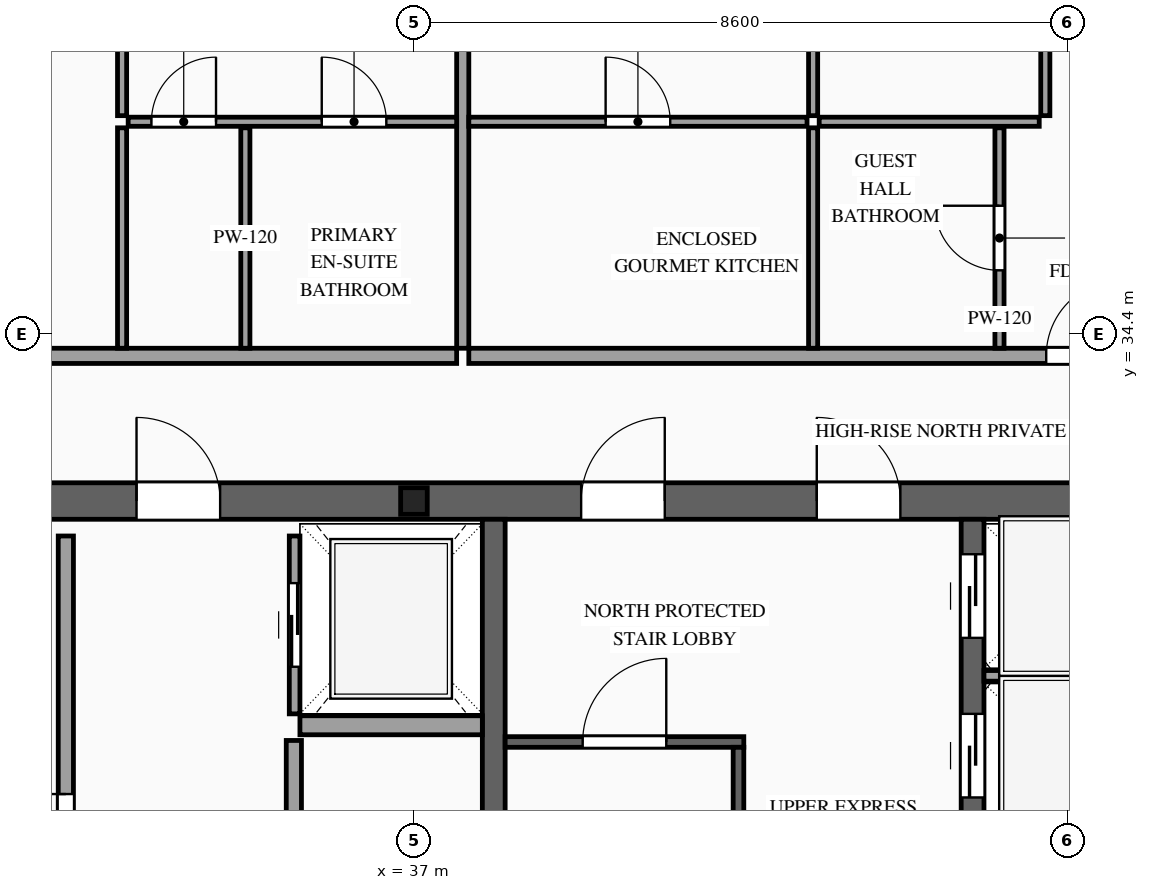
"""IFC4 building model, lengths in metres.
Left out: names, types, materials, properties, quantities, classifications, styles, units other than length and angle.
Written with IfcOpenShell. Run it as: python <this file> out.ifc"""

import sys

from ifc_helpers import new_model, si_unit, direction, frame, frame_2d, origin, origin_2d, place, context, subcontext, project, spatial, rectangle, i_section, extrude, source, transform, mapped, element, fill, save


model = new_model("IFC4")
c1 = context("Model", 3, precision=1e-05, world=origin(), true_north=direction((0.0, 1.0)))
c2 = subcontext(c1, "Body", "Model", "MODEL_VIEW")
j1 = project(units=[si_unit("LENGTHUNIT", "METRE"), si_unit("PLANEANGLEUNIT", "RADIAN")], contexts=[c1])
p1 = place(None, origin())
s1 = spatial("IfcSite", under=j1, at=p1, CompositionType="ELEMENT")
p2 = place(p1, origin())
s2 = spatial("IfcBuilding", under=s1, at=p2, CompositionType="ELEMENT")
p3 = place(p2, frame((0.0, 0.0, 289.1)))
s3 = spatial("IfcBuildingStorey", under=s2, at=p3, CompositionType="ELEMENT", Elevation=289.1)
p4 = place(p3, frame((23.56, 32.2, 0.0), z_axis=(0.0, 0.0, 1.0), x_axis=(1.0, 0.0, 0.0)))
e1 = element("IfcWall", 1, at=p4, inside=s3, PredefinedType="SHEAR", context=c2, shape_type="SweptSolid", body=[
    extrude(rectangle(XDim=26.88, YDim=0.48, at=frame_2d((13.44, 0.0))), origin(), (0.0, 0.0, 1.0), 3.5),
])
p5 = place(p4, frame((4.51, 0.0, 0.0)))
e2 = element("IfcOpeningElement", 2, at=p5, cuts=e1, PredefinedType="OPENING", context=c2, shape_type="SweptSolid", body=[
    extrude(rectangle(XDim=0.9, YDim=2.15, at=frame_2d((0.45, 1.075))), frame((0.0, 0.255, 0.0), z_axis=(0.0, -1.0, 0.0), x_axis=(1.0, 0.0, 0.0)), (0.0, 0.0, 1.0), 0.51),
])
p6 = place(p4, frame((9.79, 0.0, 0.0)))
e3 = element("IfcOpeningElement", 3, at=p6, cuts=e1, PredefinedType="OPENING", context=c2, shape_type="SweptSolid", body=[
    extrude(rectangle(XDim=1.1, YDim=2.2, at=frame_2d((0.55, 1.1))), frame((0.0, 0.255, 0.0), z_axis=(0.0, -1.0, 0.0), x_axis=(1.0, 0.0, 0.0)), (0.0, 0.0, 1.0), 0.51),
])
p7 = place(p4, frame((15.64, 0.0, 0.0)))
e4 = element("IfcOpeningElement", 4, at=p7, cuts=e1, PredefinedType="OPENING", context=c2, shape_type="SweptSolid", body=[
    extrude(rectangle(XDim=1.1, YDim=2.2, at=frame_2d((0.55, 1.1))), frame((0.0, 0.255, 0.0), z_axis=(0.0, -1.0, 0.0), x_axis=(1.0, 0.0, 0.0)), (0.0, 0.0, 1.0), 0.51),
])
p8 = place(p4, frame((18.74, 0.0, 0.0)))
e5 = element("IfcOpeningElement", 5, at=p8, cuts=e1, PredefinedType="OPENING", context=c2, shape_type="SweptSolid", body=[
    extrude(rectangle(XDim=1.1, YDim=2.2, at=frame_2d((0.55, 1.1))), frame((0.0, 0.255, 0.0), z_axis=(0.0, -1.0, 0.0), x_axis=(1.0, 0.0, 0.0)), (0.0, 0.0, 1.0), 0.51),
])
m1 = source(origin(), c2, "Body", "SweptSolid", [
    extrude(rectangle(XDim=12.32, YDim=0.3, at=frame_2d((6.16, 0.0))), origin(), (0.0, 0.0, 1.0), 3.5),
])
p9 = place(p3, frame((38.05, 19.64, 0.0), z_axis=(0.0, 0.0, 1.0), x_axis=(0.0, 1.0, 0.0)))
e6 = element("IfcWall", 6, at=p9, inside=s3, PredefinedType="SOLIDWALL", context=c2, shape_type="MappedRepresentation", body=[
    mapped(m1, transform((0.0, 0.0, 0.0), scale=1.0)),
])
p10 = place(p3, frame((44.35, 19.64, 0.0), z_axis=(0.0, 0.0, 1.0), x_axis=(0.0, 1.0, 0.0)))
e7 = element("IfcWall", 7, at=p10, inside=s3, PredefinedType="SOLIDWALL", context=c2, shape_type="SweptSolid", body=[
    extrude(rectangle(XDim=12.32, YDim=0.3, at=frame_2d((6.16, 0.0))), origin(), (0.0, 0.0, 1.0), 3.5),
])
p11 = place(p10, frame((6.56, 0.0, 0.0)))
e8 = element("IfcOpeningElement", 8, at=p11, cuts=e7, PredefinedType="OPENING", context=c2, shape_type="SweptSolid", body=[
    extrude(rectangle(XDim=1.1, YDim=2.2, at=frame_2d((0.55, 1.1))), frame((0.0, 0.165, 0.0), z_axis=(0.0, -1.0, 0.0), x_axis=(1.0, 0.0, 0.0)), (0.0, 0.0, 1.0), 0.33),
])
p12 = place(p10, frame((8.66, 0.0, 0.0)))
e9 = element("IfcOpeningElement", 9, at=p12, cuts=e7, PredefinedType="OPENING", context=c2, shape_type="SweptSolid", body=[
    extrude(rectangle(XDim=1.1, YDim=2.2, at=frame_2d((0.55, 1.1))), frame((0.0, 0.165, 0.0), z_axis=(0.0, -1.0, 0.0), x_axis=(1.0, 0.0, 0.0)), (0.0, 0.0, 1.0), 0.33),
])
p13 = place(p10, frame((10.76, 0.0, 0.0)))
e10 = element("IfcOpeningElement", 10, at=p13, cuts=e7, PredefinedType="OPENING", context=c2, shape_type="SweptSolid", body=[
    extrude(rectangle(XDim=1.1, YDim=2.2, at=frame_2d((0.55, 1.1))), frame((0.0, 0.165, 0.0), z_axis=(0.0, -1.0, 0.0), x_axis=(1.0, 0.0, 0.0)), (0.0, 0.0, 1.0), 0.33),
])
m2 = source(origin(), c2, "Body", "SweptSolid", [
    extrude(i_section(OverallWidth=0.35, OverallDepth=0.35, WebThickness=0.012, FlangeThickness=0.019, at=origin_2d()), origin(), (0.0, 0.0, 1.0), 3.5),
])
p14 = place(p3, frame((37.0, 32.2, 0.0), z_axis=(0.0, 0.0, 1.0), x_axis=(1.0, 0.0, 0.0)))
e11 = element("IfcColumn", 11, at=p14, inside=s3, PredefinedType="COLUMN", context=c2, shape_type="MappedRepresentation", body=[
    mapped(m2, transform((0.0, 0.0, 0.0), scale=1.0)),
])
p15 = place(p3, frame((35.43, 29.4, 0.0), z_axis=(0.0, 0.0, 1.0), x_axis=(0.0, 1.0, 0.0)))
e12 = element("IfcWall", 12, at=p15, inside=s3, PredefinedType="SOLIDWALL", context=c2, shape_type="SweptSolid", body=[
    extrude(rectangle(XDim=2.34, YDim=0.14, at=frame_2d((1.17, 0.0))), origin(), (0.0, 0.0, 1.0), 3.28),
])
p16 = place(p15, frame((0.62, 0.0, 0.0)))
e13 = element("IfcOpeningElement", 13, at=p16, cuts=e12, PredefinedType="OPENING", context=c2, shape_type="SweptSolid", body=[
    extrude(rectangle(XDim=1.1, YDim=2.2, at=frame_2d((0.55, 1.1))), frame((0.0, 0.085, 0.0), z_axis=(0.0, -1.0, 0.0), x_axis=(1.0, 0.0, 0.0)), (0.0, 0.0, 1.0), 0.17),
])
m3 = source(origin(), c2, "Body", "SweptSolid", [
    extrude(rectangle(XDim=2.4, YDim=0.25, at=frame_2d((1.2, 0.0))), origin(), (0.0, 0.0, 1.0), 3.28),
])
p17 = place(p3, frame((35.5, 29.25, 0.0), z_axis=(0.0, 0.0, 1.0), x_axis=(1.0, 0.0, 0.0)))
e14 = element("IfcWall", 14, at=p17, inside=s3, PredefinedType="SOLIDWALL", context=c2, shape_type="MappedRepresentation", body=[
    mapped(m3, transform((0.0, 0.0, 0.0), scale=1.0)),
])
m4 = source(origin(), c2, "Body", "SweptSolid", [
    extrude(rectangle(XDim=2.0, YDim=0.14, at=frame_2d((1.0, 0.0))), origin(), (0.0, 0.0, 1.0), 3.28),
])
p18 = place(p3, frame((44.5, 29.9, 0.0), z_axis=(0.0, 0.0, 1.0), x_axis=(1.0, 0.0, 0.0)))
e15 = element("IfcWall", 15, at=p18, inside=s3, PredefinedType="SOLIDWALL", context=c2, shape_type="MappedRepresentation", body=[
    mapped(m4, transform((0.0, 0.0, 0.0), scale=1.0)),
])
p19 = place(p3, frame((38.2, 29.03, 0.0), z_axis=(0.0, 0.0, 1.0), x_axis=(1.0, 0.0, 0.0)))
e16 = element("IfcWall", 16, at=p19, inside=s3, PredefinedType="SOLIDWALL", context=c2, shape_type="SweptSolid", body=[
    extrude(rectangle(XDim=3.14, YDim=0.14, at=frame_2d((1.57, 0.0))), origin(), (0.0, 0.0, 1.0), 3.28),
])
p20 = place(p19, frame((1.02, 0.0, 0.0)))
e17 = element("IfcOpeningElement", 17, at=p20, cuts=e16, PredefinedType="OPENING", context=c2, shape_type="SweptSolid", body=[
    extrude(rectangle(XDim=1.1, YDim=2.2, at=frame_2d((0.55, 1.1))), frame((0.0, 0.085, 0.0), z_axis=(0.0, -1.0, 0.0), x_axis=(1.0, 0.0, 0.0)), (0.0, 0.0, 1.0), 0.17),
])
m5 = source(origin(), c2, "Body", "SweptSolid", [
    extrude(rectangle(XDim=8.94, YDim=0.14, at=frame_2d((4.47, 0.0))), origin(), (0.0, 0.0, 1.0), 3.28),
])
p21 = place(p3, frame((41.27, 20.02, 0.0), z_axis=(0.0, 0.0, 1.0), x_axis=(0.0, 1.0, 0.0)))
e18 = element("IfcWall", 18, at=p21, inside=s3, PredefinedType="SOLIDWALL", context=c2, shape_type="MappedRepresentation", body=[
    mapped(m5, transform((0.0, 0.0, 0.0), scale=1.0)),
])
p22 = place(p3, frame((32.42, 24.05, 0.0), z_axis=(0.0, 0.0, 1.0), x_axis=(0.0, 1.0, 0.0)))
e19 = element("IfcWall", 19, at=p22, inside=s3, PredefinedType="PARTITIONING", context=c2, shape_type="SweptSolid", body=[
    extrude(rectangle(XDim=7.69, YDim=0.2, at=frame_2d((3.845, 0.0))), origin(), (0.0, 0.0, 1.0), 3.28),
])
p23 = place(p22, frame((3.395, 0.0, 0.0)))
e20 = element("IfcOpeningElement", 20, at=p23, cuts=e19, PredefinedType="OPENING", context=c2, shape_type="SweptSolid", body=[
    extrude(rectangle(XDim=0.9, YDim=2.15, at=frame_2d((0.45, 1.075))), frame((0.0, 0.115, 0.0), z_axis=(0.0, -1.0, 0.0), x_axis=(1.0, 0.0, 0.0)), (0.0, 0.0, 1.0), 0.23),
])
p24 = place(p3, frame((35.42, 19.86, 0.0), z_axis=(0.0, 0.0, 1.0), x_axis=(0.0, 1.0, 0.0)))
e21 = element("IfcWall", 21, at=p24, inside=s3, PredefinedType="PARTITIONING", context=c2, shape_type="SweptSolid", body=[
    extrude(rectangle(XDim=9.19, YDim=0.2, at=frame_2d((4.595, 0.0))), origin(), (0.0, 0.0, 1.0), 3.28),
])
p25 = place(p24, frame((4.145, 0.0, 0.0)))
e22 = element("IfcOpeningElement", 22, at=p25, cuts=e21, PredefinedType="OPENING", context=c2, shape_type="SweptSolid", body=[
    extrude(rectangle(XDim=0.9, YDim=2.15, at=frame_2d((0.45, 1.075))), frame((0.0, 0.115, 0.0), z_axis=(0.0, -1.0, 0.0), x_axis=(1.0, 0.0, 0.0)), (0.0, 0.0, 1.0), 0.23),
])
p26 = place(p3, frame((20.94, 34.11, 0.0), z_axis=(0.0, 0.0, 1.0), x_axis=(1.0, 0.0, 0.0)))
e23 = element("IfcWall", 23, at=p26, inside=s3, PredefinedType="PARTITIONING", context=c2, shape_type="SweptSolid", body=[
    extrude(rectangle(XDim=16.622, YDim=0.2, at=frame_2d((8.311, 0.0))), origin(), (0.0, 0.0, 1.0), 3.28),
])
p27 = place(p26, frame((9.611, 0.0, 0.0)))
e24 = element("IfcOpeningElement", 24, at=p27, cuts=e23, PredefinedType="OPENING", context=c2, shape_type="SweptSolid", body=[
    extrude(rectangle(XDim=1.0, YDim=2.2, at=frame_2d((0.5, 1.1))), frame((0.0, 0.115, 0.0), z_axis=(0.0, -1.0, 0.0), x_axis=(1.0, 0.0, 0.0)), (0.0, 0.0, 1.0), 0.23),
])
m6 = source(origin(), c2, "Body", "SweptSolid", [
    extrude(rectangle(XDim=10.54, YDim=0.16, at=frame_2d((5.27, 0.0))), origin(), (0.0, 0.0, 1.0), 3.28),
])
p28 = place(p3, frame((37.642, 34.21, 0.0), z_axis=(0.0, 0.0, 1.0), x_axis=(0.0, 1.0, 0.0)))
e25 = element("IfcWall", 25, at=p28, inside=s3, PredefinedType="PARTITIONING", context=c2, shape_type="MappedRepresentation", body=[
    mapped(m6, transform((0.0, 0.0, 0.0), scale=1.0)),
])
m7 = source(origin(), c2, "Body", "SweptSolid", [
    extrude(rectangle(XDim=2.9, YDim=0.12, at=frame_2d((1.45, 0.0))), origin(), (0.0, 0.0, 1.0), 3.28),
])
for number, where, z_axis, x_axis in (
    (26, (34.782, 34.21, 0.0), (0.0, 0.0, 1.0), (0.0, 1.0, 0.0)),
    (27, (33.16, 34.21, 0.0), (0.0, 0.0, 1.0), (0.0, 1.0, 0.0)),
):
    element("IfcWall", number, at=place(p3, frame(where, z_axis=z_axis, x_axis=x_axis)), inside=s3, PredefinedType="PARTITIONING", context=c2, shape_type="MappedRepresentation", body=[
        mapped(m7, transform((0.0, 0.0, 0.0), scale=1.0)),
    ])
p29 = place(p3, frame((33.24, 37.19, 0.0), z_axis=(0.0, 0.0, 1.0), x_axis=(1.0, 0.0, 0.0)))
e28 = element("IfcWall", 28, at=p29, inside=s3, PredefinedType="PARTITIONING", context=c2, shape_type="SweptSolid", body=[
    extrude(rectangle(XDim=4.322, YDim=0.12, at=frame_2d((2.161, 0.0))), origin(), (0.0, 0.0, 1.0), 3.28),
])
p30 = place(p29, frame((2.547, 0.0, 0.0)))
e29 = element("IfcOpeningElement", 29, at=p30, cuts=e28, PredefinedType="OPENING", context=c2, shape_type="SweptSolid", body=[
    extrude(rectangle(XDim=0.85, YDim=2.1, at=frame_2d((0.425, 1.05))), frame((0.0, 0.075, 0.0), z_axis=(0.0, -1.0, 0.0), x_axis=(1.0, 0.0, 0.0)), (0.0, 0.0, 1.0), 0.15),
])
p31 = place(p29, frame((0.306, 0.0, 0.0)))
e30 = element("IfcOpeningElement", 30, at=p31, cuts=e28, PredefinedType="OPENING", context=c2, shape_type="SweptSolid", body=[
    extrude(rectangle(XDim=0.85, YDim=2.1, at=frame_2d((0.425, 1.05))), frame((0.0, 0.075, 0.0), z_axis=(0.0, -1.0, 0.0), x_axis=(1.0, 0.0, 0.0)), (0.0, 0.0, 1.0), 0.15),
])
p32 = place(p3, frame((33.16, 37.27, 0.0), z_axis=(0.0, 0.0, 1.0), x_axis=(0.0, 1.0, 0.0)))
e31 = element("IfcWall", 31, at=p32, inside=s3, PredefinedType="PARTITIONING", context=c2, shape_type="SweptSolid", body=[
    extrude(rectangle(XDim=7.48, YDim=0.12, at=frame_2d((3.74, 0.0))), origin(), (0.0, 0.0, 1.0), 3.28),
])
p33 = place(p32, frame((3.29, 0.0, 0.0)))
e32 = element("IfcOpeningElement", 32, at=p33, cuts=e31, PredefinedType="OPENING", context=c2, shape_type="SweptSolid", body=[
    extrude(rectangle(XDim=0.9, YDim=2.15, at=frame_2d((0.45, 1.075))), frame((0.0, 0.075, 0.0), z_axis=(0.0, -1.0, 0.0), x_axis=(1.0, 0.0, 0.0)), (0.0, 0.0, 1.0), 0.15),
])
p34 = place(p3, frame((37.722, 34.11, 0.0), z_axis=(0.0, 0.0, 1.0), x_axis=(1.0, 0.0, 0.0)))
e33 = element("IfcWall", 33, at=p34, inside=s3, PredefinedType="PARTITIONING", context=c2, shape_type="SweptSolid", body=[
    extrude(rectangle(XDim=15.338, YDim=0.2, at=frame_2d((7.669, 0.0))), origin(), (0.0, 0.0, 1.0), 3.28),
])
p35 = place(p34, frame((7.597, 0.0, 0.0)))
e34 = element("IfcOpeningElement", 34, at=p35, cuts=e33, PredefinedType="OPENING", context=c2, shape_type="SweptSolid", body=[
    extrude(rectangle(XDim=1.0, YDim=2.2, at=frame_2d((0.5, 1.1))), frame((0.0, 0.115, 0.0), z_axis=(0.0, -1.0, 0.0), x_axis=(1.0, 0.0, 0.0)), (0.0, 0.0, 1.0), 0.23),
])
p36 = place(p3, frame((37.722, 37.19, 0.0), z_axis=(0.0, 0.0, 1.0), x_axis=(1.0, 0.0, 0.0)))
e35 = element("IfcWall", 35, at=p36, inside=s3, PredefinedType="PARTITIONING", context=c2, shape_type="SweptSolid", body=[
    extrude(rectangle(XDim=4.45, YDim=0.12, at=frame_2d((2.225, 0.0))), origin(), (0.0, 0.0, 1.0), 3.28),
])
p37 = place(p36, frame((1.8, 0.0, 0.0)))
e36 = element("IfcOpeningElement", 36, at=p37, cuts=e35, PredefinedType="OPENING", context=c2, shape_type="SweptSolid", body=[
    extrude(rectangle(XDim=0.85, YDim=2.1, at=frame_2d((0.425, 1.05))), frame((0.0, 0.075, 0.0), z_axis=(0.0, -1.0, 0.0), x_axis=(1.0, 0.0, 0.0)), (0.0, 0.0, 1.0), 0.15),
])
p38 = place(p3, frame((42.252, 34.21, 0.0), z_axis=(0.0, 0.0, 1.0), x_axis=(0.0, 1.0, 0.0)))
e37 = element("IfcWall", 37, at=p38, inside=s3, PredefinedType="PARTITIONING", context=c2, shape_type="MappedRepresentation", body=[
    mapped(m7, transform((0.0, 0.0, 0.0), scale=1.0)),
])
p39 = place(p3, frame((44.704, 34.21, 0.0), z_axis=(0.0, 0.0, 1.0), x_axis=(0.0, 1.0, 0.0)))
e38 = element("IfcWall", 38, at=p39, inside=s3, PredefinedType="PARTITIONING", context=c2, shape_type="SweptSolid", body=[
    extrude(rectangle(XDim=2.9, YDim=0.12, at=frame_2d((1.45, 0.0))), origin(), (0.0, 0.0, 1.0), 3.28),
])
p40 = place(p39, frame((1.025, 0.0, 0.0)))
e39 = element("IfcOpeningElement", 39, at=p40, cuts=e38, PredefinedType="OPENING", context=c2, shape_type="SweptSolid", body=[
    extrude(rectangle(XDim=0.85, YDim=2.1, at=frame_2d((0.425, 1.05))), frame((0.0, 0.075, 0.0), z_axis=(0.0, -1.0, 0.0), x_axis=(1.0, 0.0, 0.0)), (0.0, 0.0, 1.0), 0.15),
])
p41 = place(p3, frame((42.252, 37.27, 0.0), z_axis=(0.0, 0.0, 1.0), x_axis=(0.0, 1.0, 0.0)))
e40 = element("IfcWall", 40, at=p41, inside=s3, PredefinedType="PARTITIONING", context=c2, shape_type="SweptSolid", body=[
    extrude(rectangle(XDim=7.48, YDim=0.12, at=frame_2d((3.74, 0.0))), origin(), (0.0, 0.0, 1.0), 3.28),
])
p42 = place(p41, frame((3.29, 0.0, 0.0)))
e41 = element("IfcOpeningElement", 41, at=p42, cuts=e40, PredefinedType="OPENING", context=c2, shape_type="SweptSolid", body=[
    extrude(rectangle(XDim=0.9, YDim=2.15, at=frame_2d((0.45, 1.075))), frame((0.0, 0.075, 0.0), z_axis=(0.0, -1.0, 0.0), x_axis=(1.0, 0.0, 0.0)), (0.0, 0.0, 1.0), 0.15),
])
m8 = source(origin(), c2, "Body", "SweptSolid", [
    extrude(rectangle(XDim=2.895, YDim=0.12, at=frame_2d((1.448, 0.0))), origin(), (0.0, 0.0, 1.0), 3.28),
])
p43 = place(p3, frame((42.332, 37.19, 0.0), z_axis=(0.0, 0.0, 1.0), x_axis=(1.0, 0.0, 0.0)))
e42 = element("IfcWall", 42, at=p43, inside=s3, PredefinedType="PARTITIONING", context=c2, shape_type="MappedRepresentation", body=[
    mapped(m8, transform((0.0, 0.0, 0.0), scale=1.0)),
])
p44 = place(p3, frame((45.307, 37.27, 0.0), z_axis=(0.0, 0.0, 1.0), x_axis=(0.0, 1.0, 0.0)))
e43 = element("IfcWall", 43, at=p44, inside=s3, PredefinedType="PARTITIONING", context=c2, shape_type="SweptSolid", body=[
    extrude(rectangle(XDim=7.48, YDim=0.12, at=frame_2d((3.74, 0.0))), origin(), (0.0, 0.0, 1.0), 3.28),
])
p45 = place(p44, frame((3.29, 0.0, 0.0)))
e44 = element("IfcOpeningElement", 44, at=p45, cuts=e43, PredefinedType="OPENING", context=c2, shape_type="SweptSolid", body=[
    extrude(rectangle(XDim=0.9, YDim=2.15, at=frame_2d((0.45, 1.075))), frame((0.0, 0.075, 0.0), z_axis=(0.0, -1.0, 0.0), x_axis=(1.0, 0.0, 0.0)), (0.0, 0.0, 1.0), 0.15),
])
m9 = source(origin(), c2, "Body", "SweptSolid", [
    extrude(rectangle(XDim=1.1, YDim=2.2, at=frame_2d((0.55, 1.1))), frame((0.0, 0.025, 0.0), z_axis=(0.0, -1.0, 0.0), x_axis=(1.0, 0.0, 0.0)), (0.0, 0.0, 1.0), 0.05),
])
p46 = place(p16, origin())
e45 = element("IfcDoor", 45, at=p46, inside=s3, OperationType="SLIDING_TO_RIGHT", PredefinedType="DOOR", context=c2, shape_type="MappedRepresentation", body=[
    mapped(m9, transform((0.0, 0.0, 0.0), scale=1.0)),
])
fill(e13, e45)
p47 = place(p12, origin())
e46 = element("IfcDoor", 46, at=p47, inside=s3, OperationType="SLIDING_TO_RIGHT", PredefinedType="DOOR", context=c2, shape_type="MappedRepresentation", body=[
    mapped(m9, transform((0.0, 0.0, 0.0), scale=1.0)),
])
fill(e9, e46)
p48 = place(p13, origin())
e47 = element("IfcDoor", 47, at=p48, inside=s3, OperationType="SLIDING_TO_LEFT", PredefinedType="DOOR", context=c2, shape_type="MappedRepresentation", body=[
    mapped(m9, transform((0.0, 0.0, 0.0), scale=1.0)),
])
fill(e10, e47)
m10 = source(origin(), c2, "Body", "SweptSolid", [
    extrude(rectangle(XDim=1.1, YDim=2.2, at=frame_2d((0.55, 1.1))), frame((0.0, 0.025, 0.0), z_axis=(0.0, -1.0, 0.0), x_axis=(1.0, 0.0, 0.0)), (0.0, 0.0, 1.0), 0.05),
])
p49 = place(p20, origin())
e48 = element("IfcDoor", 48, at=p49, inside=s3, OperationType="SINGLE_SWING_RIGHT", PredefinedType="DOOR", context=c2, shape_type="MappedRepresentation", body=[
    mapped(m10, transform((0.0, 0.0, 0.0), scale=1.0)),
])
fill(e17, e48)
p50 = place(p6, origin())
e49 = element("IfcDoor", 49, at=p50, inside=s3, OperationType="SINGLE_SWING_LEFT", PredefinedType="DOOR", context=c2, shape_type="MappedRepresentation", body=[
    mapped(m10, transform((0.0, 0.0, 0.0), scale=1.0)),
])
fill(e3, e49)
p51 = place(p7, origin())
e50 = element("IfcDoor", 50, at=p51, inside=s3, OperationType="SINGLE_SWING_RIGHT", PredefinedType="DOOR", context=c2, shape_type="MappedRepresentation", body=[
    mapped(m10, transform((0.0, 0.0, 0.0), scale=1.0)),
])
fill(e4, e50)
p52 = place(p8, origin())
e51 = element("IfcDoor", 51, at=p52, inside=s3, OperationType="SINGLE_SWING_LEFT", PredefinedType="DOOR", context=c2, shape_type="MappedRepresentation", body=[
    mapped(m10, transform((0.0, 0.0, 0.0), scale=1.0)),
])
fill(e5, e51)
m11 = source(origin(), c2, "Body", "SweptSolid", [
    extrude(rectangle(XDim=0.9, YDim=2.15, at=frame_2d((0.45, 1.075))), frame((0.0, 0.025, 0.0), z_axis=(0.0, -1.0, 0.0), x_axis=(1.0, 0.0, 0.0)), (0.0, 0.0, 1.0), 0.05),
])
p53 = place(p23, origin())
e52 = element("IfcDoor", 52, at=p53, inside=s3, OperationType="SINGLE_SWING_RIGHT", PredefinedType="DOOR", context=c2, shape_type="MappedRepresentation", body=[
    mapped(m11, transform((0.0, 0.0, 0.0), scale=1.0)),
])
fill(e20, e52)
m12 = source(origin(), c2, "Body", "SweptSolid", [
    extrude(rectangle(XDim=0.85, YDim=2.1, at=frame_2d((0.425, 1.05))), frame((0.0, 0.025, 0.0), z_axis=(0.0, -1.0, 0.0), x_axis=(1.0, 0.0, 0.0)), (0.0, 0.0, 1.0), 0.05),
])
p54 = place(p30, origin())
e53 = element("IfcDoor", 53, at=p54, inside=s3, OperationType="SINGLE_SWING_LEFT", PredefinedType="DOOR", context=c2, shape_type="MappedRepresentation", body=[
    mapped(m12, transform((0.0, 0.0, 0.0), scale=1.0)),
])
fill(e29, e53)
p55 = place(p31, origin())
e54 = element("IfcDoor", 54, at=p55, inside=s3, OperationType="SINGLE_SWING_RIGHT", PredefinedType="DOOR", context=c2, shape_type="MappedRepresentation", body=[
    mapped(m12, transform((0.0, 0.0, 0.0), scale=1.0)),
])
fill(e30, e54)
m13 = source(origin(), c2, "Body", "SweptSolid", [
    extrude(rectangle(XDim=1.0, YDim=2.2, at=frame_2d((0.5, 1.1))), frame((0.0, 0.025, 0.0), z_axis=(0.0, -1.0, 0.0), x_axis=(1.0, 0.0, 0.0)), (0.0, 0.0, 1.0), 0.05),
])
p56 = place(p35, origin())
e55 = element("IfcDoor", 55, at=p56, inside=s3, OperationType="SINGLE_SWING_RIGHT", PredefinedType="DOOR", context=c2, shape_type="MappedRepresentation", body=[
    mapped(m13, transform((0.0, 0.0, 0.0), scale=1.0)),
])
fill(e34, e55)
p57 = place(p37, origin())
e56 = element("IfcDoor", 56, at=p57, inside=s3, OperationType="SINGLE_SWING_LEFT", PredefinedType="DOOR", context=c2, shape_type="MappedRepresentation", body=[
    mapped(m12, transform((0.0, 0.0, 0.0), scale=1.0)),
])
fill(e36, e56)
p58 = place(p40, origin())
e57 = element("IfcDoor", 57, at=p58, inside=s3, OperationType="SINGLE_SWING_RIGHT", PredefinedType="DOOR", context=c2, shape_type="MappedRepresentation", body=[
    mapped(m12, transform((0.0, 0.0, 0.0), scale=1.0)),
])
fill(e39, e57)
save(model, sys.argv[1])
